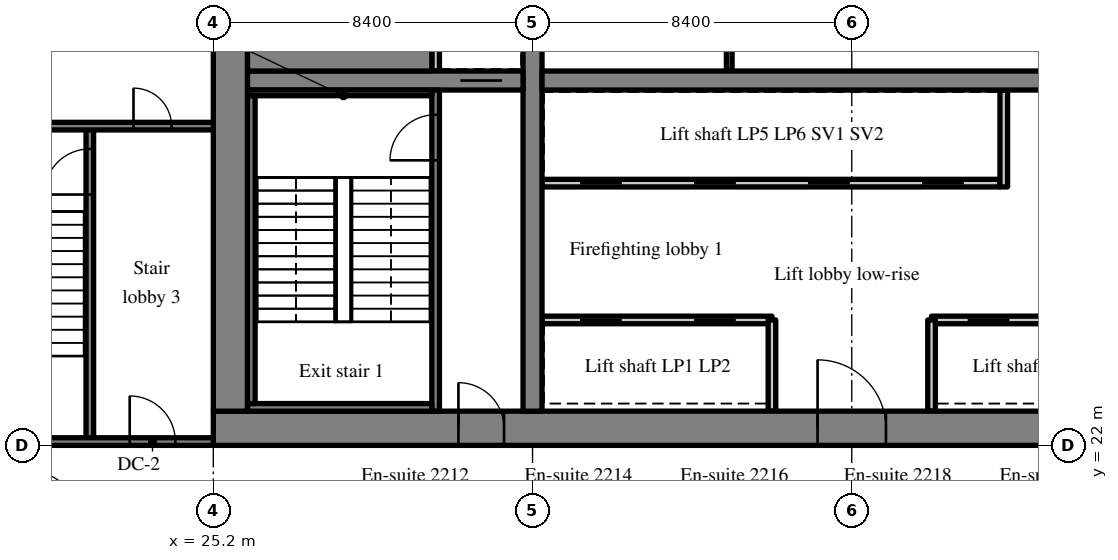
"""IFC4 building model, lengths in metres.
Left out: names, types, materials, properties, quantities, classifications, styles, units other than length and angle.
Written with IfcOpenShell. Run it as: python <this file> out.ifc"""

import sys

from ifc_helpers import new_model, si_unit, direction, frame, frame_2d, origin, place, context, subcontext, project, spatial, rectangle, extrude, source, transform, mapped, element, fill, save


model = new_model("IFC4")
c1 = context("Model", 3, precision=1e-05, world=origin(), true_north=direction((0.0, 1.0)))
c2 = subcontext(c1, "Body", "Model", "MODEL_VIEW")
j1 = project(units=[si_unit("LENGTHUNIT", "METRE"), si_unit("PLANEANGLEUNIT", "RADIAN")], contexts=[c1])
p1 = place(None, origin())
s1 = spatial("IfcSite", under=j1, at=p1, CompositionType="ELEMENT")
p2 = place(p1, origin())
s2 = spatial("IfcBuilding", under=s1, at=p2, CompositionType="ELEMENT")
p3 = place(p2, frame((0.0, 0.0, 95.2)))
s3 = spatial("IfcBuildingStorey", under=s2, at=p3, CompositionType="ELEMENT", Elevation=95.2)
m1 = source(origin(), c2, "Body", "SweptSolid", [
    extrude(rectangle(XDim=50.4, YDim=0.9, at=frame_2d((25.2, 0.0))), origin(), (0.0, 0.0, 1.0), 3.52),
])
p4 = place(p3, frame((25.2, 22.45, 0.0), z_axis=(0.0, 0.0, 1.0), x_axis=(1.0, 0.0, 0.0)))
e1 = element("IfcWall", 1, at=p4, inside=s3, PredefinedType="SHEAR", context=c2, shape_type="MappedRepresentation", body=[
    mapped(m1, transform((0.0, 0.0, 0.0), scale=1.0)),
])
m2 = source(origin(), c2, "Body", "SweptSolid", [
    extrude(rectangle(XDim=1.8, YDim=2.1, at=frame_2d((0.9, 1.05))), frame((0.0, 0.46, 0.0), z_axis=(0.0, -1.0, 0.0), x_axis=(1.0, 0.0, 0.0)), (0.0, 0.0, 1.0), 0.92),
])
p5 = place(p4, frame((15.9, 0.0, 0.0)))
e2 = element("IfcOpeningElement", 2, at=p5, cuts=e1, PredefinedType="OPENING", context=c2, shape_type="MappedRepresentation", body=[
    mapped(m2, transform((0.0, 0.0, 0.0), scale=1.0)),
])
m3 = source(origin(), c2, "Body", "SweptSolid", [
    extrude(rectangle(XDim=1.2, YDim=2.1, at=frame_2d((0.6, 1.05))), frame((0.0, 0.46, 0.0), z_axis=(0.0, -1.0, 0.0), x_axis=(1.0, 0.0, 0.0)), (0.0, 0.0, 1.0), 0.92),
])
p6 = place(p4, frame((26.975, 0.0, 0.0)))
e3 = element("IfcOpeningElement", 3, at=p6, cuts=e1, PredefinedType="OPENING", context=c2, shape_type="MappedRepresentation", body=[
    mapped(m3, transform((0.0, 0.0, 0.0), scale=1.0)),
])
m4 = source(origin(), c2, "Body", "SweptSolid", [
    extrude(rectangle(XDim=0.9, YDim=2.1, at=frame_2d((0.45, 1.05))), frame((0.0, 0.46, 0.0), z_axis=(0.0, -1.0, 0.0), x_axis=(1.0, 0.0, 0.0)), (0.0, 0.0, 1.0), 0.92),
])
p7 = place(p4, frame((34.5, 0.0, 0.0)))
e4 = element("IfcOpeningElement", 4, at=p7, cuts=e1, PredefinedType="OPENING", context=c2, shape_type="MappedRepresentation", body=[
    mapped(m4, transform((0.0, 0.0, 0.0), scale=1.0)),
])
p8 = place(p4, frame((31.5, 0.0, 0.0)))
e5 = element("IfcOpeningElement", 5, at=p8, cuts=e1, PredefinedType="OPENING", context=c2, shape_type="MappedRepresentation", body=[
    mapped(m4, transform((0.0, 0.0, 0.0), scale=1.0)),
])
p9 = place(p4, frame((39.788, 0.0, 0.0)))
e6 = element("IfcOpeningElement", 6, at=p9, cuts=e1, PredefinedType="OPENING", context=c2, shape_type="MappedRepresentation", body=[
    mapped(m4, transform((0.0, 0.0, 0.0), scale=1.0)),
])
p10 = place(p4, frame((36.762, 0.0, 0.0)))
e7 = element("IfcOpeningElement", 7, at=p10, cuts=e1, PredefinedType="OPENING", context=c2, shape_type="MappedRepresentation", body=[
    mapped(m4, transform((0.0, 0.0, 0.0), scale=1.0)),
])
p11 = place(p4, frame((6.45, 0.0, 0.0)))
e8 = element("IfcOpeningElement", 8, at=p11, cuts=e1, PredefinedType="OPENING", context=c2, shape_type="MappedRepresentation", body=[
    mapped(m3, transform((0.0, 0.0, 0.0), scale=1.0)),
])
p12 = place(p4, frame((47.775, 0.0, 0.0)))
e9 = element("IfcOpeningElement", 9, at=p12, cuts=e1, PredefinedType="OPENING", context=c2, shape_type="MappedRepresentation", body=[
    mapped(m3, transform((0.0, 0.0, 0.0), scale=1.0)),
])
m5 = source(origin(), c2, "Body", "SweptSolid", [
    extrude(rectangle(XDim=18.2, YDim=0.9, at=frame_2d((9.1, 0.0))), origin(), (0.0, 0.0, 1.0), 3.52),
])
p13 = place(p3, frame((25.65, 22.9, 0.0), z_axis=(0.0, 0.0, 1.0), x_axis=(0.0, 1.0, 0.0)))
e10 = element("IfcWall", 10, at=p13, inside=s3, PredefinedType="SHEAR", context=c2, shape_type="MappedRepresentation", body=[
    mapped(m5, transform((0.0, 0.0, 0.0), scale=1.0)),
])
m6 = source(origin(), c2, "Body", "SweptSolid", [
    extrude(rectangle(XDim=18.2, YDim=0.5, at=frame_2d((9.1, 0.0))), origin(), (0.0, 0.0, 1.0), 3.52),
])
p14 = place(p3, frame((33.6, 22.9, 0.0), z_axis=(0.0, 0.0, 1.0), x_axis=(0.0, 1.0, 0.0)))
e11 = element("IfcWall", 11, at=p14, inside=s3, PredefinedType="SHEAR", context=c2, shape_type="MappedRepresentation", body=[
    mapped(m6, transform((0.0, 0.0, 0.0), scale=1.0)),
])
m7 = source(origin(), c2, "Body", "SweptSolid", [
    extrude(rectangle(XDim=1.1, YDim=2.1, at=frame_2d((0.55, 1.05))), frame((0.0, 0.26, 0.0), z_axis=(0.0, -1.0, 0.0), x_axis=(1.0, 0.0, 0.0)), (0.0, 0.0, 1.0), 0.52),
])
p15 = place(p14, frame((12.55, 0.0, 0.0)))
e12 = element("IfcOpeningElement", 12, at=p15, cuts=e11, PredefinedType="OPENING", context=c2, shape_type="MappedRepresentation", body=[
    mapped(m7, transform((0.0, 0.0, 0.0), scale=1.0)),
])
m8 = source(origin(), c2, "Body", "SweptSolid", [
    extrude(rectangle(XDim=7.25, YDim=0.5, at=frame_2d((3.625, 0.0))), origin(), (0.0, 0.0, 1.0), 3.52),
])
p16 = place(p3, frame((26.1, 31.6, 0.0), z_axis=(0.0, 0.0, 1.0), x_axis=(1.0, 0.0, 0.0)))
e13 = element("IfcWall", 13, at=p16, inside=s3, PredefinedType="SHEAR", context=c2, shape_type="MappedRepresentation", body=[
    mapped(m8, transform((0.0, 0.0, 0.0), scale=1.0)),
])
p17 = place(p16, frame((5.6, 0.0, 0.0)))
e14 = element("IfcOpeningElement", 14, at=p17, cuts=e13, PredefinedType="OPENING", context=c2, shape_type="MappedRepresentation", body=[
    mapped(m7, transform((0.0, 0.0, 0.0), scale=1.0)),
])
m9 = source(origin(), c2, "Body", "SweptSolid", [
    extrude(rectangle(XDim=16.3, YDim=0.5, at=frame_2d((8.15, 0.0))), origin(), (0.0, 0.0, 1.0), 3.52),
])
p18 = place(p3, frame((33.85, 31.6, 0.0), z_axis=(0.0, 0.0, 1.0), x_axis=(1.0, 0.0, 0.0)))
e15 = element("IfcWall", 15, at=p18, inside=s3, PredefinedType="SHEAR", context=c2, shape_type="MappedRepresentation", body=[
    mapped(m9, transform((0.0, 0.0, 0.0), scale=1.0)),
])
m10 = source(origin(), c2, "Body", "SweptSolid", [
    extrude(rectangle(XDim=1.0, YDim=2.1, at=frame_2d((0.5, 1.05))), frame((0.0, 0.26, 0.0), z_axis=(0.0, -1.0, 0.0), x_axis=(1.0, 0.0, 0.0)), (0.0, 0.0, 1.0), 0.52),
])
p19 = place(p18, frame((14.725, 0.0, 0.0)))
e16 = element("IfcOpeningElement", 16, at=p19, cuts=e15, PredefinedType="OPENING", context=c2, shape_type="MappedRepresentation", body=[
    mapped(m10, transform((0.0, 0.0, 0.0), scale=1.0)),
])
m11 = source(origin(), c2, "Body", "SweptSolid", [
    extrude(rectangle(XDim=6.05, YDim=0.2, at=frame_2d((3.025, 0.0))), origin(), (0.0, 0.0, 1.0), 3.52),
])
p20 = place(p3, frame((33.85, 25.3, 0.0), z_axis=(0.0, 0.0, 1.0), x_axis=(1.0, 0.0, 0.0)))
e17 = element("IfcWall", 17, at=p20, inside=s3, PredefinedType="SOLIDWALL", context=c2, shape_type="MappedRepresentation", body=[
    mapped(m11, transform((0.0, 0.0, 0.0), scale=1.0)),
])
m12 = source(origin(), c2, "Body", "SweptSolid", [
    extrude(rectangle(XDim=1.1, YDim=2.1, at=frame_2d((0.55, 1.05))), frame((0.0, 0.11, 0.0), z_axis=(0.0, -1.0, 0.0), x_axis=(1.0, 0.0, 0.0)), (0.0, 0.0, 1.0), 0.22),
])
p21 = place(p20, frame((1.0, 0.0, 0.0)))
e18 = element("IfcOpeningElement", 18, at=p21, cuts=e17, PredefinedType="OPENING", context=c2, shape_type="MappedRepresentation", body=[
    mapped(m12, transform((0.0, 0.0, 0.0), scale=1.0)),
])
p22 = place(p20, frame((4.0, 0.0, 0.0)))
e19 = element("IfcOpeningElement", 19, at=p22, cuts=e17, PredefinedType="OPENING", context=c2, shape_type="MappedRepresentation", body=[
    mapped(m12, transform((0.0, 0.0, 0.0), scale=1.0)),
])
m13 = source(origin(), c2, "Body", "SweptSolid", [
    extrude(rectangle(XDim=6.0, YDim=0.2, at=frame_2d((3.0, 0.0))), origin(), (0.0, 0.0, 1.0), 3.52),
])
p23 = place(p3, frame((44.1, 25.3, 0.0), z_axis=(0.0, 0.0, 1.0), x_axis=(1.0, 0.0, 0.0)))
e20 = element("IfcWall", 20, at=p23, inside=s3, PredefinedType="SOLIDWALL", context=c2, shape_type="MappedRepresentation", body=[
    mapped(m13, transform((0.0, 0.0, 0.0), scale=1.0)),
])
p24 = place(p23, frame((0.95, 0.0, 0.0)))
e21 = element("IfcOpeningElement", 21, at=p24, cuts=e20, PredefinedType="OPENING", context=c2, shape_type="MappedRepresentation", body=[
    mapped(m12, transform((0.0, 0.0, 0.0), scale=1.0)),
])
p25 = place(p23, frame((3.95, 0.0, 0.0)))
e22 = element("IfcOpeningElement", 22, at=p25, cuts=e20, PredefinedType="OPENING", context=c2, shape_type="MappedRepresentation", body=[
    mapped(m12, transform((0.0, 0.0, 0.0), scale=1.0)),
])
m14 = source(origin(), c2, "Body", "SweptSolid", [
    extrude(rectangle(XDim=12.05, YDim=0.2, at=frame_2d((6.025, 0.0))), origin(), (0.0, 0.0, 1.0), 3.52),
])
p26 = place(p3, frame((33.85, 28.9, 0.0), z_axis=(0.0, 0.0, 1.0), x_axis=(1.0, 0.0, 0.0)))
e23 = element("IfcWall", 23, at=p26, inside=s3, PredefinedType="SOLIDWALL", context=c2, shape_type="MappedRepresentation", body=[
    mapped(m14, transform((0.0, 0.0, 0.0), scale=1.0)),
])
p27 = place(p26, frame((1.0, 0.0, 0.0)))
e24 = element("IfcOpeningElement", 24, at=p27, cuts=e23, PredefinedType="OPENING", context=c2, shape_type="MappedRepresentation", body=[
    mapped(m12, transform((0.0, 0.0, 0.0), scale=1.0)),
])
p28 = place(p26, frame((4.0, 0.0, 0.0)))
e25 = element("IfcOpeningElement", 25, at=p28, cuts=e23, PredefinedType="OPENING", context=c2, shape_type="MappedRepresentation", body=[
    mapped(m12, transform((0.0, 0.0, 0.0), scale=1.0)),
])
p29 = place(p26, frame((7.0, 0.0, 0.0)))
e26 = element("IfcOpeningElement", 26, at=p29, cuts=e23, PredefinedType="OPENING", context=c2, shape_type="MappedRepresentation", body=[
    mapped(m12, transform((0.0, 0.0, 0.0), scale=1.0)),
])
p30 = place(p26, frame((10.0, 0.0, 0.0)))
e27 = element("IfcOpeningElement", 27, at=p30, cuts=e23, PredefinedType="OPENING", context=c2, shape_type="MappedRepresentation", body=[
    mapped(m12, transform((0.0, 0.0, 0.0), scale=1.0)),
])
m15 = source(origin(), c2, "Body", "SweptSolid", [
    extrude(rectangle(XDim=2.4, YDim=0.2, at=frame_2d((1.2, 0.0))), origin(), (0.0, 0.0, 1.0), 3.52),
])
for number, where, z_axis, x_axis in (
    (28, (39.9, 22.9, 0.0), (0.0, 0.0, 1.0), (0.0, 1.0, 0.0)),
    (29, (44.1, 22.9, 0.0), (0.0, 0.0, 1.0), (0.0, 1.0, 0.0)),
):
    element("IfcWall", number, at=place(p3, frame(where, z_axis=z_axis, x_axis=x_axis)), inside=s3, PredefinedType="SOLIDWALL", context=c2, shape_type="MappedRepresentation", body=[
        mapped(m15, transform((0.0, 0.0, 0.0), scale=1.0)),
    ])
m16 = source(origin(), c2, "Body", "SweptSolid", [
    extrude(rectangle(XDim=2.55, YDim=0.2, at=frame_2d((1.275, 0.0))), origin(), (0.0, 0.0, 1.0), 3.52),
])
p31 = place(p3, frame((46.0, 28.8, 0.0), z_axis=(0.0, 0.0, 1.0), x_axis=(0.0, 1.0, 0.0)))
e30 = element("IfcWall", 30, at=p31, inside=s3, PredefinedType="SOLIDWALL", context=c2, shape_type="MappedRepresentation", body=[
    mapped(m16, transform((0.0, 0.0, 0.0), scale=1.0)),
])
m17 = source(origin(), c2, "Body", "SweptSolid", [
    extrude(rectangle(XDim=3.15, YDim=0.15, at=frame_2d((1.575, 0.0))), origin(), (0.0, 0.0, 1.0), 3.52),
])
p32 = place(p3, frame((38.776, 31.85, 0.0), z_axis=(0.0, 0.0, 1.0), x_axis=(0.0, 1.0, 0.0)))
e31 = element("IfcWall", 31, at=p32, inside=s3, PredefinedType="PARTITIONING", context=c2, shape_type="MappedRepresentation", body=[
    mapped(m17, transform((0.0, 0.0, 0.0), scale=1.0)),
])
m18 = source(origin(), c2, "Body", "SweptSolid", [
    extrude(rectangle(XDim=8.45, YDim=0.2, at=frame_2d((4.225, 0.0))), origin(), (0.0, 0.0, 1.0), 3.52),
])
p33 = place(p3, frame((31.05, 22.9, 0.0), z_axis=(0.0, 0.0, 1.0), x_axis=(0.0, 1.0, 0.0)))
e32 = element("IfcWall", 32, at=p33, inside=s3, PredefinedType="SOLIDWALL", context=c2, shape_type="MappedRepresentation", body=[
    mapped(m18, transform((0.0, 0.0, 0.0), scale=1.0)),
])
m19 = source(origin(), c2, "Body", "SweptSolid", [
    extrude(rectangle(XDim=1.2, YDim=2.1, at=frame_2d((0.6, 1.05))), frame((0.0, 0.11, 0.0), z_axis=(0.0, -1.0, 0.0), x_axis=(1.0, 0.0, 0.0)), (0.0, 0.0, 1.0), 0.22),
])
p34 = place(p33, frame((6.6, 0.0, 0.0)))
e33 = element("IfcOpeningElement", 33, at=p34, cuts=e32, PredefinedType="OPENING", context=c2, shape_type="MappedRepresentation", body=[
    mapped(m19, transform((0.0, 0.0, 0.0), scale=1.0)),
])
m20 = source(origin(), c2, "Body", "SweptSolid", [
    extrude(rectangle(XDim=1.75, YDim=0.2, at=frame_2d((0.875, 0.0))), origin(), (0.0, 0.0, 1.0), 3.52),
])
p35 = place(p3, frame((31.05, 31.85, 0.0), z_axis=(0.0, 0.0, 1.0), x_axis=(0.0, 1.0, 0.0)))
e34 = element("IfcWall", 34, at=p35, inside=s3, PredefinedType="SOLIDWALL", context=c2, shape_type="MappedRepresentation", body=[
    mapped(m20, transform((0.0, 0.0, 0.0), scale=1.0)),
])
m21 = source(origin(), c2, "Body", "SweptSolid", [
    extrude(rectangle(XDim=8.3, YDim=0.2, at=frame_2d((4.15, 0.0))), origin(), (0.0, 0.0, 1.0), 3.52),
])
p36 = place(p3, frame((21.95, 22.1, 0.0), z_axis=(0.0, 0.0, 1.0), x_axis=(0.0, 1.0, 0.0)))
e35 = element("IfcWall", 35, at=p36, inside=s3, PredefinedType="SOLIDWALL", context=c2, shape_type="MappedRepresentation", body=[
    mapped(m21, transform((0.0, 0.0, 0.0), scale=1.0)),
])
p37 = place(p36, frame((6.5, 0.0, 0.0)))
e36 = element("IfcOpeningElement", 36, at=p37, cuts=e35, PredefinedType="OPENING", context=c2, shape_type="MappedRepresentation", body=[
    mapped(m19, transform((0.0, 0.0, 0.0), scale=1.0)),
])
m22 = source(origin(), c2, "Body", "SweptSolid", [
    extrude(rectangle(XDim=8.225, YDim=0.2, at=frame_2d((4.112, 0.0))), origin(), (0.0, 0.0, 1.0), 3.52),
])
p38 = place(p3, frame((16.975, 22.1, 0.0), z_axis=(0.0, 0.0, 1.0), x_axis=(1.0, 0.0, 0.0)))
e37 = element("IfcWall", 37, at=p38, inside=s3, PredefinedType="SOLIDWALL", context=c2, shape_type="MappedRepresentation", body=[
    mapped(m22, transform((0.0, 0.0, 0.0), scale=1.0)),
])
p39 = place(p38, frame((6.025, 0.0, 0.0)))
e38 = element("IfcOpeningElement", 38, at=p39, cuts=e37, PredefinedType="OPENING", context=c2, shape_type="MappedRepresentation", body=[
    mapped(m19, transform((0.0, 0.0, 0.0), scale=1.0)),
])
p40 = place(p3, frame((16.975, 30.4, 0.0), z_axis=(0.0, 0.0, 1.0), x_axis=(1.0, 0.0, 0.0)))
e39 = element("IfcWall", 39, at=p40, inside=s3, PredefinedType="SOLIDWALL", context=c2, shape_type="MappedRepresentation", body=[
    mapped(m22, transform((0.0, 0.0, 0.0), scale=1.0)),
])
m23 = source(origin(), c2, "Body", "SweptSolid", [
    extrude(rectangle(XDim=1.0, YDim=2.1, at=frame_2d((0.5, 1.05))), frame((0.0, 0.11, 0.0), z_axis=(0.0, -1.0, 0.0), x_axis=(1.0, 0.0, 0.0)), (0.0, 0.0, 1.0), 0.22),
])
p41 = place(p40, frame((6.125, 0.0, 0.0)))
e40 = element("IfcOpeningElement", 40, at=p41, cuts=e39, PredefinedType="OPENING", context=c2, shape_type="MappedRepresentation", body=[
    mapped(m23, transform((0.0, 0.0, 0.0), scale=1.0)),
])
m24 = source(origin(), c2, "Body", "SweptSolid", [
    extrude(rectangle(XDim=4.85, YDim=0.2, at=frame_2d((2.425, 0.0))), origin(), (0.0, 0.0, 1.0), 3.52),
])
p42 = place(p3, frame((26.1, 23.0, 0.0), z_axis=(0.0, 0.0, 1.0), x_axis=(1.0, 0.0, 0.0)))
e41 = element("IfcWall", 41, at=p42, inside=s3, PredefinedType="SOLIDWALL", context=c2, shape_type="MappedRepresentation", body=[
    mapped(m24, transform((0.0, 0.0, 0.0), scale=1.0)),
])
m25 = source(origin(), c2, "Body", "SweptSolid", [
    extrude(rectangle(XDim=4.85, YDim=0.15, at=frame_2d((2.425, 0.0))), origin(), (0.0, 0.0, 1.0), 3.52),
])
p43 = place(p3, frame((26.1, 31.275, 0.0), z_axis=(0.0, 0.0, 1.0), x_axis=(1.0, 0.0, 0.0)))
e42 = element("IfcWall", 42, at=p43, inside=s3, PredefinedType="SOLIDWALL", context=c2, shape_type="MappedRepresentation", body=[
    mapped(m25, transform((0.0, 0.0, 0.0), scale=1.0)),
])
m26 = source(origin(), c2, "Body", "SweptSolid", [
    extrude(rectangle(XDim=8.1, YDim=0.2, at=frame_2d((4.05, 0.0))), origin(), (0.0, 0.0, 1.0), 3.52),
])
p44 = place(p3, frame((26.2, 23.1, 0.0), z_axis=(0.0, 0.0, 1.0), x_axis=(0.0, 1.0, 0.0)))
e43 = element("IfcWall", 43, at=p44, inside=s3, PredefinedType="SOLIDWALL", context=c2, shape_type="MappedRepresentation", body=[
    mapped(m26, transform((0.0, 0.0, 0.0), scale=1.0)),
])
m27 = source(origin(), c2, "Body", "SweptSolid", [
    extrude(rectangle(XDim=4.85, YDim=0.95, at=frame_2d((2.425, 0.0))), origin(), (0.0, 0.0, 1.0), 3.52),
])
p45 = place(p3, frame((26.1, 32.325, 0.0), z_axis=(0.0, 0.0, 1.0), x_axis=(1.0, 0.0, 0.0)))
e44 = element("IfcWall", 44, at=p45, inside=s3, PredefinedType="SOLIDWALL", context=c2, shape_type="MappedRepresentation", body=[
    mapped(m27, transform((0.0, 0.0, 0.0), scale=1.0)),
])
m28 = source(origin(), c2, "Body", "SweptSolid", [
    extrude(rectangle(XDim=1.8, YDim=2.1, at=frame_2d((0.9, 1.05))), frame((0.0, 0.375, 0.0), z_axis=(0.0, -1.0, 0.0), x_axis=(1.0, 0.0, 0.0)), (0.0, 0.0, 1.0), 0.05),
])
p46 = place(p5, origin())
e45 = element("IfcDoor", 45, at=p46, inside=s3, OperationType="DOUBLE_DOOR_SINGLE_SWING", PredefinedType="DOOR", context=c2, shape_type="MappedRepresentation", body=[
    mapped(m28, transform((0.0, 0.0, 0.0), scale=1.0)),
])
fill(e2, e45)
m29 = source(origin(), c2, "Body", "SweptSolid", [
    extrude(rectangle(XDim=1.1, YDim=2.1, at=frame_2d((0.55, 1.05))), frame((0.0, 0.025, 0.0), z_axis=(0.0, -1.0, 0.0), x_axis=(1.0, 0.0, 0.0)), (0.0, 0.0, 1.0), 0.05),
])
p47 = place(p21, origin())
e46 = element("IfcDoor", 46, at=p47, inside=s3, OperationType="SLIDING_TO_LEFT", PredefinedType="DOOR", context=c2, shape_type="MappedRepresentation", body=[
    mapped(m29, transform((0.0, 0.0, 0.0), scale=1.0)),
])
fill(e18, e46)
p48 = place(p22, origin())
e47 = element("IfcDoor", 47, at=p48, inside=s3, OperationType="SLIDING_TO_RIGHT", PredefinedType="DOOR", context=c2, shape_type="MappedRepresentation", body=[
    mapped(m29, transform((0.0, 0.0, 0.0), scale=1.0)),
])
fill(e19, e47)
p49 = place(p24, origin())
e48 = element("IfcDoor", 48, at=p49, inside=s3, OperationType="SLIDING_TO_LEFT", PredefinedType="DOOR", context=c2, shape_type="MappedRepresentation", body=[
    mapped(m29, transform((0.0, 0.0, 0.0), scale=1.0)),
])
fill(e21, e48)
p50 = place(p27, origin())
e49 = element("IfcDoor", 49, at=p50, inside=s3, OperationType="SLIDING_TO_LEFT", PredefinedType="DOOR", context=c2, shape_type="MappedRepresentation", body=[
    mapped(m29, transform((0.0, 0.0, 0.0), scale=1.0)),
])
fill(e24, e49)
p51 = place(p28, origin())
e50 = element("IfcDoor", 50, at=p51, inside=s3, OperationType="SLIDING_TO_RIGHT", PredefinedType="DOOR", context=c2, shape_type="MappedRepresentation", body=[
    mapped(m29, transform((0.0, 0.0, 0.0), scale=1.0)),
])
fill(e25, e50)
p52 = place(p29, origin())
e51 = element("IfcDoor", 51, at=p52, inside=s3, OperationType="SLIDING_TO_LEFT", PredefinedType="DOOR", context=c2, shape_type="MappedRepresentation", body=[
    mapped(m29, transform((0.0, 0.0, 0.0), scale=1.0)),
])
fill(e26, e51)
p53 = place(p30, origin())
e52 = element("IfcDoor", 52, at=p53, inside=s3, OperationType="SLIDING_TO_RIGHT", PredefinedType="DOOR", context=c2, shape_type="MappedRepresentation", body=[
    mapped(m29, transform((0.0, 0.0, 0.0), scale=1.0)),
])
fill(e27, e52)
m30 = source(origin(), c2, "Body", "SweptSolid", [
    extrude(rectangle(XDim=1.2, YDim=2.1, at=frame_2d((0.6, 1.05))), frame((0.0, 0.025, 0.0), z_axis=(0.0, -1.0, 0.0), x_axis=(1.0, 0.0, 0.0)), (0.0, 0.0, 1.0), 0.05),
])
p54 = place(p34, origin())
e53 = element("IfcDoor", 53, at=p54, inside=s3, OperationType="SINGLE_SWING_LEFT", PredefinedType="DOOR", context=c2, shape_type="MappedRepresentation", body=[
    mapped(m30, transform((0.0, 0.0, 0.0), scale=1.0)),
])
fill(e33, e53)
m31 = source(origin(), c2, "Body", "SweptSolid", [
    extrude(rectangle(XDim=1.2, YDim=2.1, at=frame_2d((0.6, 1.05))), frame((0.0, 0.375, 0.0), z_axis=(0.0, -1.0, 0.0), x_axis=(1.0, 0.0, 0.0)), (0.0, 0.0, 1.0), 0.05),
])
p55 = place(p11, origin())
e54 = element("IfcDoor", 54, at=p55, inside=s3, OperationType="SINGLE_SWING_LEFT", PredefinedType="DOOR", context=c2, shape_type="MappedRepresentation", body=[
    mapped(m31, transform((0.0, 0.0, 0.0), scale=1.0)),
])
fill(e8, e54)
p56 = place(p17, origin())
e55 = element("IfcDoor", 55, at=p56, inside=s3, OperationType="SLIDING_TO_RIGHT", PredefinedType="DOOR", context=c2, shape_type="MappedRepresentation", body=[
    mapped(m29, transform((0.0, 0.0, 0.0), scale=1.0)),
])
fill(e14, e55)
p57 = place(p37, origin())
e56 = element("IfcDoor", 56, at=p57, inside=s3, OperationType="SINGLE_SWING_LEFT", PredefinedType="DOOR", context=c2, shape_type="MappedRepresentation", body=[
    mapped(m30, transform((0.0, 0.0, 0.0), scale=1.0)),
])
fill(e36, e56)
p58 = place(p39, origin())
e57 = element("IfcDoor", 57, at=p58, inside=s3, OperationType="SINGLE_SWING_LEFT", PredefinedType="DOOR", context=c2, shape_type="MappedRepresentation", body=[
    mapped(m30, transform((0.0, 0.0, 0.0), scale=1.0)),
])
fill(e38, e57)
m32 = source(origin(), c2, "Body", "SweptSolid", [
    extrude(rectangle(XDim=1.0, YDim=2.1, at=frame_2d((0.5, 1.05))), frame((0.0, 0.025, 0.0), z_axis=(0.0, -1.0, 0.0), x_axis=(1.0, 0.0, 0.0)), (0.0, 0.0, 1.0), 0.05),
])
p59 = place(p41, origin())
e58 = element("IfcDoor", 58, at=p59, inside=s3, OperationType="SINGLE_SWING_LEFT", PredefinedType="DOOR", context=c2, shape_type="MappedRepresentation", body=[
    mapped(m32, transform((0.0, 0.0, 0.0), scale=1.0)),
])
fill(e40, e58)
save(model, sys.argv[1])
